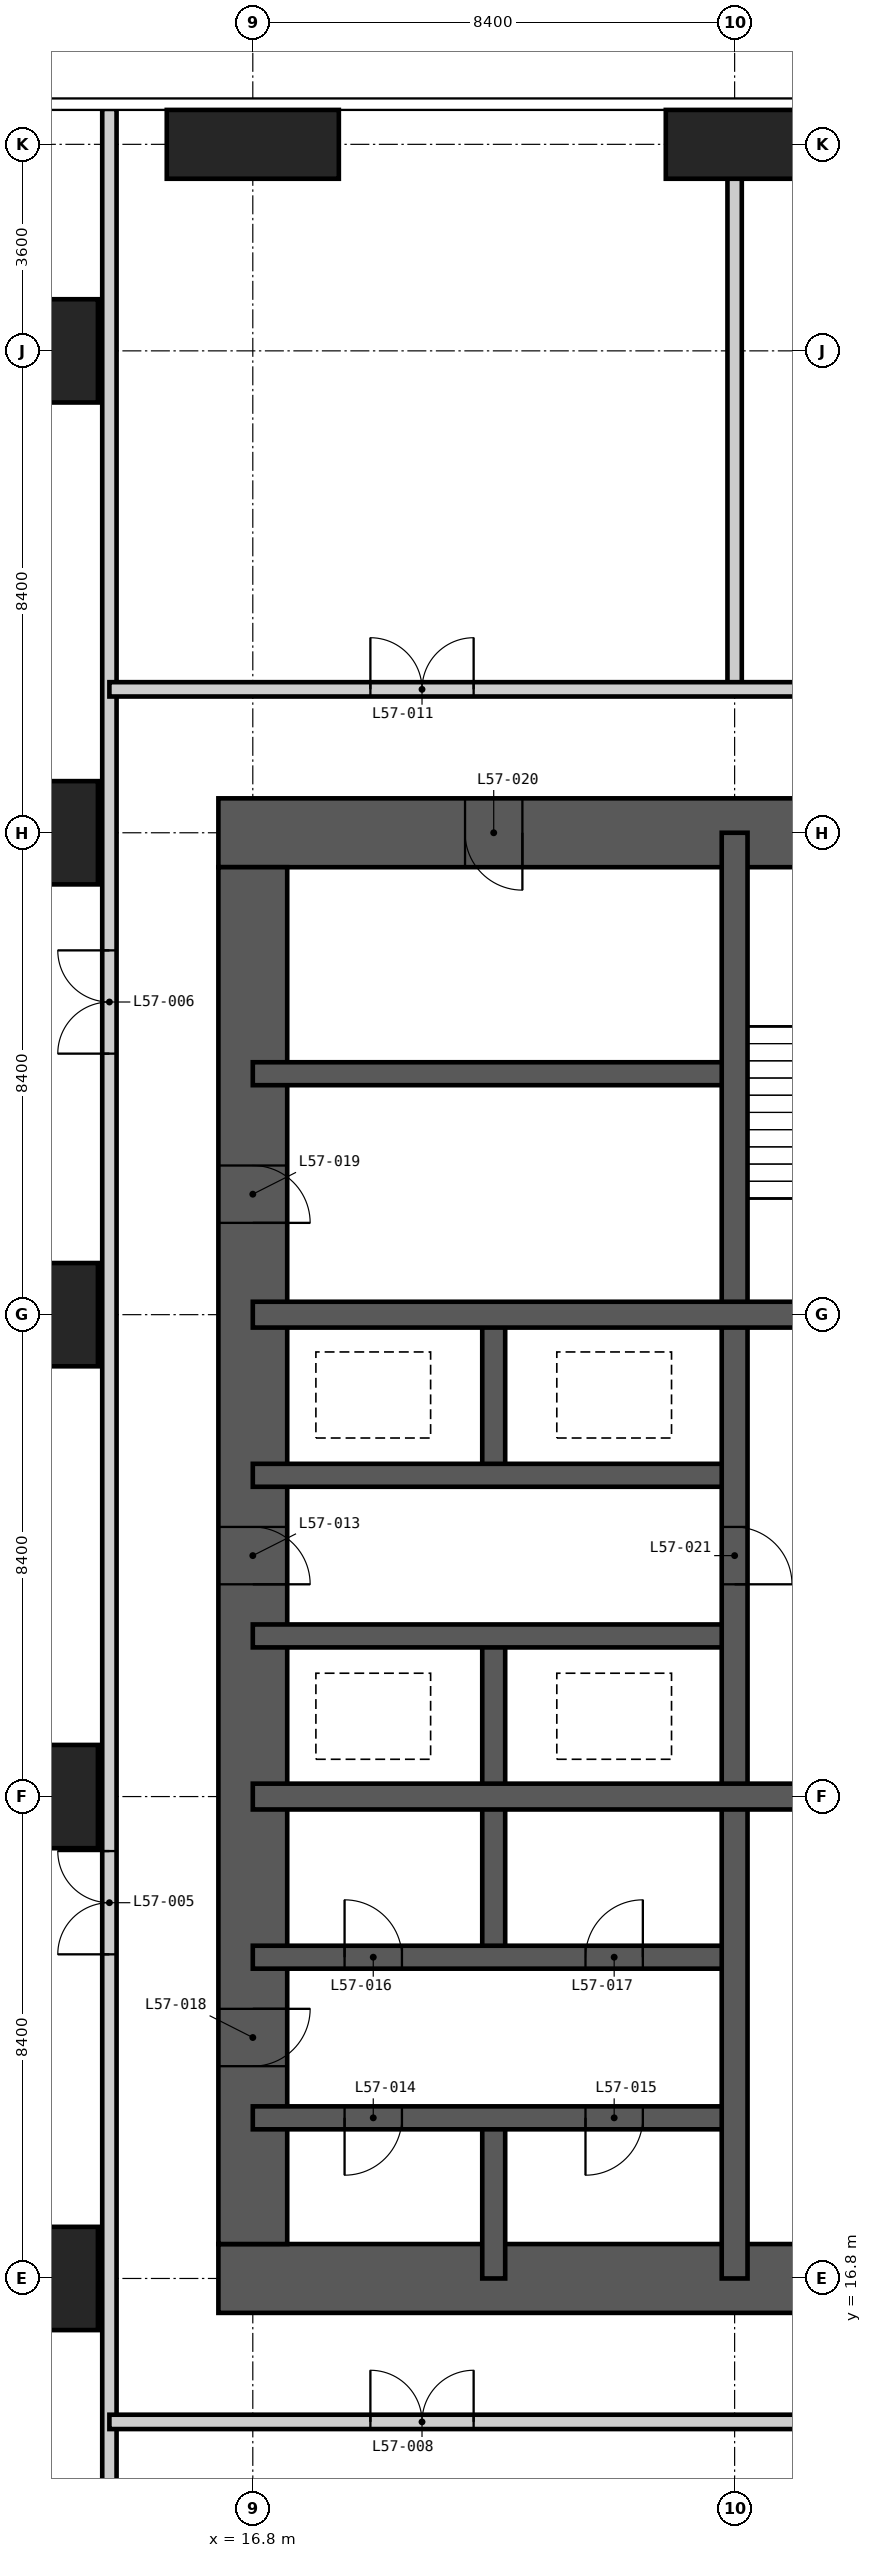
"""IFC4 building model, lengths in metres.
Left out: names, types, materials, properties, quantities, classifications, styles, units other than length and angle.
Written with IfcOpenShell. Run it as: python <this file> out.ifc"""

import sys

from ifc_helpers import new_model, si_unit, direction, frame, frame_2d, origin, origin_2d, place, context, subcontext, project, spatial, rectangle, extrude, element, fill, save


model = new_model("IFC4")
c1 = context("Model", 3, precision=1e-05, world=origin(), true_north=direction((0.0, 1.0)))
c2 = subcontext(c1, "Body", "Model", "MODEL_VIEW")
j1 = project(units=[si_unit("LENGTHUNIT", "METRE"), si_unit("PLANEANGLEUNIT", "RADIAN")], contexts=[c1])
p1 = place(None, origin())
s1 = spatial("IfcSite", under=j1, at=p1, CompositionType="ELEMENT")
p2 = place(p1, origin())
s2 = spatial("IfcBuilding", under=s1, at=p2, CompositionType="ELEMENT")
p3 = place(p2, frame((0.0, 0.0, 220.2)))
s3 = spatial("IfcBuildingStorey", under=s2, at=p3, CompositionType="ELEMENT", Elevation=220.2)
for number, where, z_axis, x_axis in (
    (1, (13.2, 16.8, -0.4), (0.0, 0.0, 1.0), (1.0, 0.0, 0.0)),
    (2, (13.2, 25.2, -0.4), (0.0, 0.0, 1.0), (1.0, 0.0, 0.0)),
    (3, (13.2, 33.6, -0.4), (0.0, 0.0, 1.0), (1.0, 0.0, 0.0)),
    (4, (13.2, 42.0, -0.4), (0.0, 0.0, 1.0), (1.0, 0.0, 0.0)),
    (5, (13.2, 50.4, -0.4), (0.0, 0.0, 1.0), (1.0, 0.0, 0.0)),
):
    element("IfcColumn", number, at=place(p3, frame(where, z_axis=z_axis, x_axis=x_axis)), inside=s3, PredefinedType="COLUMN", context=c2, shape_type="SweptSolid", body=[
        extrude(rectangle(XDim=1.8, YDim=1.8, at=origin_2d()), origin(), (0.0, 0.0, 1.0), 5.45),
    ])
p4 = place(p3, frame((16.8, 54.0, -0.4), z_axis=(0.0, 0.0, 1.0), x_axis=(1.0, 0.0, 0.0)))
e6 = element("IfcColumn", 6, at=p4, inside=s3, PredefinedType="COLUMN", context=c2, shape_type="SweptSolid", body=[
    extrude(rectangle(XDim=3.0, YDim=1.2, at=origin_2d()), origin(), (0.0, 0.0, 1.0), 5.45),
])
p5 = place(p3, frame((25.2, 54.0, -0.4), z_axis=(0.0, 0.0, 1.0), x_axis=(1.0, 0.0, 0.0)))
e7 = element("IfcColumn", 7, at=p5, inside=s3, PredefinedType="COLUMN", context=c2, shape_type="SweptSolid", body=[
    extrude(rectangle(XDim=2.4, YDim=1.2, at=origin_2d()), origin(), (0.0, 0.0, 1.0), 5.45),
])
p6 = place(p3, frame((16.2, 16.8, -0.4), z_axis=(0.0, 0.0, 1.0), x_axis=(1.0, 0.0, 0.0)))
e8 = element("IfcWall", 8, at=p6, inside=s3, PredefinedType="SHEAR", context=c2, shape_type="SweptSolid", body=[
    extrude(rectangle(XDim=26.4, YDim=1.2, at=frame_2d((13.2, 0.0))), origin(), (0.0, 0.0, 1.0), 5.45),
])
p7 = place(p6, frame((12.7, 0.0, 0.4)))
e9 = element("IfcOpeningElement", 9, at=p7, cuts=e8, PredefinedType="OPENING", context=c2, shape_type="SweptSolid", body=[
    extrude(rectangle(XDim=1.0, YDim=2.1, at=frame_2d((0.5, 1.05))), frame((0.0, 0.61, 0.0), z_axis=(0.0, -1.0, 0.0), x_axis=(1.0, 0.0, 0.0)), (0.0, 0.0, 1.0), 1.22),
])
p8 = place(p6, frame((19.0, 0.0, 0.4)))
e10 = element("IfcOpeningElement", 10, at=p8, cuts=e8, PredefinedType="OPENING", context=c2, shape_type="SweptSolid", body=[
    extrude(rectangle(XDim=1.0, YDim=2.1, at=frame_2d((0.5, 1.05))), frame((0.0, 0.61, 0.0), z_axis=(0.0, -1.0, 0.0), x_axis=(1.0, 0.0, 0.0)), (0.0, 0.0, 1.0), 1.22),
])
p9 = place(p3, frame((42.6, 42.0, -0.4), z_axis=(0.0, 0.0, 1.0), x_axis=(-1.0, 0.0, 0.0)))
e11 = element("IfcWall", 11, at=p9, inside=s3, PredefinedType="SHEAR", context=c2, shape_type="SweptSolid", body=[
    extrude(rectangle(XDim=26.4, YDim=1.2, at=frame_2d((13.2, 0.0))), origin(), (0.0, 0.0, 1.0), 5.45),
])
p10 = place(p9, frame((21.1, 0.0, 0.4)))
e12 = element("IfcOpeningElement", 12, at=p10, cuts=e11, PredefinedType="OPENING", context=c2, shape_type="SweptSolid", body=[
    extrude(rectangle(XDim=1.0, YDim=2.1, at=frame_2d((0.5, 1.05))), frame((0.0, 0.61, 0.0), z_axis=(0.0, -1.0, 0.0), x_axis=(1.0, 0.0, 0.0)), (0.0, 0.0, 1.0), 1.22),
])
p11 = place(p9, frame((10.5, 0.0, 0.4)))
e13 = element("IfcOpeningElement", 13, at=p11, cuts=e11, PredefinedType="OPENING", context=c2, shape_type="SweptSolid", body=[
    extrude(rectangle(XDim=1.2, YDim=2.2, at=frame_2d((0.6, 1.1))), frame((0.0, 0.61, 0.0), z_axis=(0.0, -1.0, 0.0), x_axis=(1.0, 0.0, 0.0)), (0.0, 0.0, 1.0), 1.22),
])
p12 = place(p3, frame((16.8, 41.4, -0.4), z_axis=(0.0, 0.0, 1.0), x_axis=(0.0, -1.0, 0.0)))
e14 = element("IfcWall", 14, at=p12, inside=s3, PredefinedType="SHEAR", context=c2, shape_type="SweptSolid", body=[
    extrude(rectangle(XDim=24.0, YDim=1.2, at=frame_2d((12.0, 0.0))), origin(), (0.0, 0.0, 1.0), 5.45),
])
p13 = place(p12, frame((11.5, 0.0, 0.4)))
e15 = element("IfcOpeningElement", 15, at=p13, cuts=e14, PredefinedType="OPENING", context=c2, shape_type="SweptSolid", body=[
    extrude(rectangle(XDim=1.0, YDim=2.1, at=frame_2d((0.5, 1.05))), frame((0.0, 0.61, 0.0), z_axis=(0.0, -1.0, 0.0), x_axis=(1.0, 0.0, 0.0)), (0.0, 0.0, 1.0), 1.22),
])
p14 = place(p12, frame((19.9, 0.0, 0.4)))
e16 = element("IfcOpeningElement", 16, at=p14, cuts=e14, PredefinedType="OPENING", context=c2, shape_type="SweptSolid", body=[
    extrude(rectangle(XDim=1.0, YDim=2.1, at=frame_2d((0.5, 1.05))), frame((0.0, 0.61, 0.0), z_axis=(0.0, -1.0, 0.0), x_axis=(1.0, 0.0, 0.0)), (0.0, 0.0, 1.0), 1.22),
])
p15 = place(p12, frame((5.2, 0.0, 0.4)))
e17 = element("IfcOpeningElement", 17, at=p15, cuts=e14, PredefinedType="OPENING", context=c2, shape_type="SweptSolid", body=[
    extrude(rectangle(XDim=1.0, YDim=2.1, at=frame_2d((0.5, 1.05))), frame((0.0, 0.61, 0.0), z_axis=(0.0, -1.0, 0.0), x_axis=(1.0, 0.0, 0.0)), (0.0, 0.0, 1.0), 1.22),
])
p16 = place(p3, frame((21.0, 16.8, -0.4), z_axis=(0.0, 0.0, 1.0), x_axis=(0.0, 1.0, 0.0)))
e18 = element("IfcWall", 18, at=p16, inside=s3, PredefinedType="SHEAR", context=c2, shape_type="SweptSolid", body=[
    extrude(rectangle(XDim=2.8, YDim=0.4, at=frame_2d((1.4, 0.0))), origin(), (0.0, 0.0, 1.0), 5.45),
])
p17 = place(p3, frame((21.0, 22.4, -0.4), z_axis=(0.0, 0.0, 1.0), x_axis=(0.0, 1.0, 0.0)))
e19 = element("IfcWall", 19, at=p17, inside=s3, PredefinedType="SHEAR", context=c2, shape_type="SweptSolid", body=[
    extrude(rectangle(XDim=5.6, YDim=0.4, at=frame_2d((2.8, 0.0))), origin(), (0.0, 0.0, 1.0), 5.45),
])
p18 = place(p3, frame((21.0, 30.8, -0.4), z_axis=(0.0, 0.0, 1.0), x_axis=(0.0, 1.0, 0.0)))
e20 = element("IfcWall", 20, at=p18, inside=s3, PredefinedType="SHEAR", context=c2, shape_type="SweptSolid", body=[
    extrude(rectangle(XDim=2.8, YDim=0.4, at=frame_2d((1.4, 0.0))), origin(), (0.0, 0.0, 1.0), 5.45),
])
p19 = place(p3, frame((16.8, 19.6, -0.4), z_axis=(0.0, 0.0, 1.0), x_axis=(1.0, 0.0, 0.0)))
e21 = element("IfcWall", 21, at=p19, inside=s3, PredefinedType="SHEAR", context=c2, shape_type="SweptSolid", body=[
    extrude(rectangle(XDim=8.4, YDim=0.4, at=frame_2d((4.2, 0.0))), origin(), (0.0, 0.0, 1.0), 5.45),
])
p20 = place(p19, frame((1.6, 0.0, 0.4)))
e22 = element("IfcOpeningElement", 22, at=p20, cuts=e21, PredefinedType="OPENING", context=c2, shape_type="SweptSolid", body=[
    extrude(rectangle(XDim=1.0, YDim=2.1, at=frame_2d((0.5, 1.05))), frame((0.0, 0.21, 0.0), z_axis=(0.0, -1.0, 0.0), x_axis=(1.0, 0.0, 0.0)), (0.0, 0.0, 1.0), 0.42),
])
p21 = place(p19, frame((5.8, 0.0, 0.4)))
e23 = element("IfcOpeningElement", 23, at=p21, cuts=e21, PredefinedType="OPENING", context=c2, shape_type="SweptSolid", body=[
    extrude(rectangle(XDim=1.0, YDim=2.1, at=frame_2d((0.5, 1.05))), frame((0.0, 0.21, 0.0), z_axis=(0.0, -1.0, 0.0), x_axis=(1.0, 0.0, 0.0)), (0.0, 0.0, 1.0), 0.42),
])
p22 = place(p3, frame((16.8, 22.4, -0.4), z_axis=(0.0, 0.0, 1.0), x_axis=(1.0, 0.0, 0.0)))
e24 = element("IfcWall", 24, at=p22, inside=s3, PredefinedType="SHEAR", context=c2, shape_type="SweptSolid", body=[
    extrude(rectangle(XDim=8.4, YDim=0.4, at=frame_2d((4.2, 0.0))), origin(), (0.0, 0.0, 1.0), 5.45),
])
p23 = place(p22, frame((1.6, 0.0, 0.4)))
e25 = element("IfcOpeningElement", 25, at=p23, cuts=e24, PredefinedType="OPENING", context=c2, shape_type="SweptSolid", body=[
    extrude(rectangle(XDim=1.0, YDim=2.1, at=frame_2d((0.5, 1.05))), frame((0.0, 0.21, 0.0), z_axis=(0.0, -1.0, 0.0), x_axis=(1.0, 0.0, 0.0)), (0.0, 0.0, 1.0), 0.42),
])
p24 = place(p22, frame((5.8, 0.0, 0.4)))
e26 = element("IfcOpeningElement", 26, at=p24, cuts=e24, PredefinedType="OPENING", context=c2, shape_type="SweptSolid", body=[
    extrude(rectangle(XDim=1.0, YDim=2.1, at=frame_2d((0.5, 1.05))), frame((0.0, 0.21, 0.0), z_axis=(0.0, -1.0, 0.0), x_axis=(1.0, 0.0, 0.0)), (0.0, 0.0, 1.0), 0.42),
])
for number, where, z_axis, x_axis in (
    (27, (16.8, 28.0, -0.4), (0.0, 0.0, 1.0), (1.0, 0.0, 0.0)),
    (28, (16.8, 30.8, -0.4), (0.0, 0.0, 1.0), (1.0, 0.0, 0.0)),
    (29, (16.8, 37.8, -0.4), (0.0, 0.0, 1.0), (1.0, 0.0, 0.0)),
):
    element("IfcWall", number, at=place(p3, frame(where, z_axis=z_axis, x_axis=x_axis)), inside=s3, PredefinedType="SHEAR", context=c2, shape_type="SweptSolid", body=[
        extrude(rectangle(XDim=8.4, YDim=0.4, at=frame_2d((4.2, 0.0))), origin(), (0.0, 0.0, 1.0), 5.45),
    ])
p25 = place(p3, frame((25.2, 16.8, -0.4), z_axis=(0.0, 0.0, 1.0), x_axis=(0.0, 1.0, 0.0)))
e30 = element("IfcWall", 30, at=p25, inside=s3, PredefinedType="SHEAR", context=c2, shape_type="SweptSolid", body=[
    extrude(rectangle(XDim=25.2, YDim=0.45, at=frame_2d((12.6, 0.0))), origin(), (0.0, 0.0, 1.0), 5.45),
])
p26 = place(p25, frame((12.1, 0.0, 0.4)))
e31 = element("IfcOpeningElement", 31, at=p26, cuts=e30, PredefinedType="OPENING", context=c2, shape_type="SweptSolid", body=[
    extrude(rectangle(XDim=1.0, YDim=2.1, at=frame_2d((0.5, 1.05))), frame((0.0, 0.235, 0.0), z_axis=(0.0, -1.0, 0.0), x_axis=(1.0, 0.0, 0.0)), (0.0, 0.0, 1.0), 0.47),
])
for number, where, z_axis, x_axis in (
    (32, (16.8, 25.2, -0.4), (0.0, 0.0, 1.0), (1.0, 0.0, 0.0)),
    (33, (16.8, 33.6, -0.4), (0.0, 0.0, 1.0), (1.0, 0.0, 0.0)),
):
    element("IfcWall", number, at=place(p3, frame(where, z_axis=z_axis, x_axis=x_axis)), inside=s3, PredefinedType="SHEAR", context=c2, shape_type="SweptSolid", body=[
        extrude(rectangle(XDim=25.2, YDim=0.45, at=frame_2d((12.6, 0.0))), origin(), (0.0, 0.0, 1.0), 5.45),
    ])
p27 = place(p3, frame((14.3, 4.182, 0.0), z_axis=(0.0, 0.0, 1.0), x_axis=(0.0, 1.0, 0.0)))
e34 = element("IfcWall", 34, at=p27, inside=s3, PredefinedType="PARTITIONING", context=c2, shape_type="SweptSolid", body=[
    extrude(rectangle(XDim=50.436, YDim=0.25, at=frame_2d((25.218, 0.0))), origin(), (0.0, 0.0, 1.0), 5.05),
])
p28 = place(p27, frame((18.268, 0.0, 0.0)))
e35 = element("IfcOpeningElement", 35, at=p28, cuts=e34, PredefinedType="OPENING", context=c2, shape_type="SweptSolid", body=[
    extrude(rectangle(XDim=1.8, YDim=2.4, at=frame_2d((0.9, 1.2))), frame((0.0, 0.135, 0.0), z_axis=(0.0, -1.0, 0.0), x_axis=(1.0, 0.0, 0.0)), (0.0, 0.0, 1.0), 0.27),
])
p29 = place(p27, frame((33.968, 0.0, 0.0)))
e36 = element("IfcOpeningElement", 36, at=p29, cuts=e34, PredefinedType="OPENING", context=c2, shape_type="SweptSolid", body=[
    extrude(rectangle(XDim=1.8, YDim=2.4, at=frame_2d((0.9, 1.2))), frame((0.0, 0.135, 0.0), z_axis=(0.0, -1.0, 0.0), x_axis=(1.0, 0.0, 0.0)), (0.0, 0.0, 1.0), 0.27),
])
p30 = place(p3, frame((25.2, 44.5, 0.0), z_axis=(0.0, 0.0, 1.0), x_axis=(0.0, 1.0, 0.0)))
e37 = element("IfcWall", 37, at=p30, inside=s3, PredefinedType="PARTITIONING", context=c2, shape_type="SweptSolid", body=[
    extrude(rectangle(XDim=10.118, YDim=0.25, at=frame_2d((5.059, 0.0))), origin(), (0.0, 0.0, 1.0), 5.05),
])
p31 = place(p3, frame((14.3, 14.3, 0.0), z_axis=(0.0, 0.0, 1.0), x_axis=(1.0, 0.0, 0.0)))
e38 = element("IfcWall", 38, at=p31, inside=s3, PredefinedType="PARTITIONING", context=c2, shape_type="SweptSolid", body=[
    extrude(rectangle(XDim=30.2, YDim=0.25, at=frame_2d((15.1, 0.0))), origin(), (0.0, 0.0, 1.0), 5.05),
])
p32 = place(p31, frame((19.65, 0.0, 0.0)))
e39 = element("IfcOpeningElement", 39, at=p32, cuts=e38, PredefinedType="OPENING", context=c2, shape_type="SweptSolid", body=[
    extrude(rectangle(XDim=1.8, YDim=2.4, at=frame_2d((0.9, 1.2))), frame((0.0, 0.135, 0.0), z_axis=(0.0, -1.0, 0.0), x_axis=(1.0, 0.0, 0.0)), (0.0, 0.0, 1.0), 0.27),
])
p33 = place(p31, frame((4.55, 0.0, 0.0)))
e40 = element("IfcOpeningElement", 40, at=p33, cuts=e38, PredefinedType="OPENING", context=c2, shape_type="SweptSolid", body=[
    extrude(rectangle(XDim=1.8, YDim=2.4, at=frame_2d((0.9, 1.2))), frame((0.0, 0.135, 0.0), z_axis=(0.0, -1.0, 0.0), x_axis=(1.0, 0.0, 0.0)), (0.0, 0.0, 1.0), 0.27),
])
p34 = place(p3, frame((14.3, 44.5, 0.0), z_axis=(0.0, 0.0, 1.0), x_axis=(1.0, 0.0, 0.0)))
e41 = element("IfcWall", 41, at=p34, inside=s3, PredefinedType="PARTITIONING", context=c2, shape_type="SweptSolid", body=[
    extrude(rectangle(XDim=30.2, YDim=0.25, at=frame_2d((15.1, 0.0))), origin(), (0.0, 0.0, 1.0), 5.05),
])
p35 = place(p34, frame((4.55, 0.0, 0.0)))
e42 = element("IfcOpeningElement", 42, at=p35, cuts=e41, PredefinedType="OPENING", context=c2, shape_type="SweptSolid", body=[
    extrude(rectangle(XDim=1.8, YDim=2.4, at=frame_2d((0.9, 1.2))), frame((0.0, 0.135, 0.0), z_axis=(0.0, -1.0, 0.0), x_axis=(1.0, 0.0, 0.0)), (0.0, 0.0, 1.0), 0.27),
])
p36 = place(p34, frame((19.65, 0.0, 0.0)))
e43 = element("IfcOpeningElement", 43, at=p36, cuts=e41, PredefinedType="OPENING", context=c2, shape_type="SweptSolid", body=[
    extrude(rectangle(XDim=1.8, YDim=2.4, at=frame_2d((0.9, 1.2))), frame((0.0, 0.135, 0.0), z_axis=(0.0, -1.0, 0.0), x_axis=(1.0, 0.0, 0.0)), (0.0, 0.0, 1.0), 0.27),
])
p37 = place(p28, origin())
e44 = element("IfcDoor", 44, at=p37, inside=s3, OperationType="DOUBLE_DOOR_DOUBLE_SWING", PredefinedType="DOOR", context=c2, shape_type="SweptSolid", body=[
    extrude(rectangle(XDim=1.8, YDim=2.4, at=frame_2d((0.9, 1.2))), frame((0.0, 0.025, 0.0), z_axis=(0.0, -1.0, 0.0), x_axis=(1.0, 0.0, 0.0)), (0.0, 0.0, 1.0), 0.05),
])
fill(e35, e44)
p38 = place(p29, origin())
e45 = element("IfcDoor", 45, at=p38, inside=s3, OperationType="DOUBLE_DOOR_DOUBLE_SWING", PredefinedType="DOOR", context=c2, shape_type="SweptSolid", body=[
    extrude(rectangle(XDim=1.8, YDim=2.4, at=frame_2d((0.9, 1.2))), frame((0.0, 0.025, 0.0), z_axis=(0.0, -1.0, 0.0), x_axis=(1.0, 0.0, 0.0)), (0.0, 0.0, 1.0), 0.05),
])
fill(e36, e45)
p39 = place(p33, origin())
e46 = element("IfcDoor", 46, at=p39, inside=s3, OperationType="DOUBLE_DOOR_DOUBLE_SWING", PredefinedType="DOOR", context=c2, shape_type="SweptSolid", body=[
    extrude(rectangle(XDim=1.8, YDim=2.4, at=frame_2d((0.9, 1.2))), frame((0.0, 0.025, 0.0), z_axis=(0.0, -1.0, 0.0), x_axis=(1.0, 0.0, 0.0)), (0.0, 0.0, 1.0), 0.05),
])
fill(e40, e46)
p40 = place(p35, origin())
e47 = element("IfcDoor", 47, at=p40, inside=s3, OperationType="DOUBLE_DOOR_DOUBLE_SWING", PredefinedType="DOOR", context=c2, shape_type="SweptSolid", body=[
    extrude(rectangle(XDim=1.8, YDim=2.4, at=frame_2d((0.9, 1.2))), frame((0.0, 0.025, 0.0), z_axis=(0.0, -1.0, 0.0), x_axis=(1.0, 0.0, 0.0)), (0.0, 0.0, 1.0), 0.05),
])
fill(e42, e47)
p41 = place(p13, origin())
e48 = element("IfcDoor", 48, at=p41, inside=s3, OperationType="SINGLE_SWING_RIGHT", PredefinedType="DOOR", context=c2, shape_type="SweptSolid", body=[
    extrude(rectangle(XDim=1.0, YDim=2.1, at=frame_2d((0.5, 1.05))), frame((0.0, 0.025, 0.0), z_axis=(0.0, -1.0, 0.0), x_axis=(1.0, 0.0, 0.0)), (0.0, 0.0, 1.0), 0.05),
])
fill(e15, e48)
p42 = place(p20, frame((1.0, 0.0, 0.0), z_axis=(0.0, 0.0, 1.0), x_axis=(-1.0, 0.0, 0.0)))
e49 = element("IfcDoor", 49, at=p42, inside=s3, OperationType="SINGLE_SWING_RIGHT", PredefinedType="DOOR", context=c2, shape_type="SweptSolid", body=[
    extrude(rectangle(XDim=1.0, YDim=2.1, at=frame_2d((0.5, 1.05))), frame((0.0, 0.025, 0.0), z_axis=(0.0, -1.0, 0.0), x_axis=(1.0, 0.0, 0.0)), (0.0, 0.0, 1.0), 0.05),
])
fill(e22, e49)
p43 = place(p21, frame((1.0, 0.0, 0.0), z_axis=(0.0, 0.0, 1.0), x_axis=(-1.0, 0.0, 0.0)))
e50 = element("IfcDoor", 50, at=p43, inside=s3, OperationType="SINGLE_SWING_RIGHT", PredefinedType="DOOR", context=c2, shape_type="SweptSolid", body=[
    extrude(rectangle(XDim=1.0, YDim=2.1, at=frame_2d((0.5, 1.05))), frame((0.0, 0.025, 0.0), z_axis=(0.0, -1.0, 0.0), x_axis=(1.0, 0.0, 0.0)), (0.0, 0.0, 1.0), 0.05),
])
fill(e23, e50)
p44 = place(p23, origin())
e51 = element("IfcDoor", 51, at=p44, inside=s3, OperationType="SINGLE_SWING_LEFT", PredefinedType="DOOR", context=c2, shape_type="SweptSolid", body=[
    extrude(rectangle(XDim=1.0, YDim=2.1, at=frame_2d((0.5, 1.05))), frame((0.0, 0.025, 0.0), z_axis=(0.0, -1.0, 0.0), x_axis=(1.0, 0.0, 0.0)), (0.0, 0.0, 1.0), 0.05),
])
fill(e25, e51)
p45 = place(p24, origin())
e52 = element("IfcDoor", 52, at=p45, inside=s3, OperationType="SINGLE_SWING_RIGHT", PredefinedType="DOOR", context=c2, shape_type="SweptSolid", body=[
    extrude(rectangle(XDim=1.0, YDim=2.1, at=frame_2d((0.5, 1.05))), frame((0.0, 0.025, 0.0), z_axis=(0.0, -1.0, 0.0), x_axis=(1.0, 0.0, 0.0)), (0.0, 0.0, 1.0), 0.05),
])
fill(e26, e52)
p46 = place(p14, origin())
e53 = element("IfcDoor", 53, at=p46, inside=s3, OperationType="SINGLE_SWING_LEFT", PredefinedType="DOOR", context=c2, shape_type="SweptSolid", body=[
    extrude(rectangle(XDim=1.0, YDim=2.1, at=frame_2d((0.5, 1.05))), frame((0.0, 0.025, 0.0), z_axis=(0.0, -1.0, 0.0), x_axis=(1.0, 0.0, 0.0)), (0.0, 0.0, 1.0), 0.05),
])
fill(e16, e53)
p47 = place(p15, origin())
e54 = element("IfcDoor", 54, at=p47, inside=s3, OperationType="SINGLE_SWING_RIGHT", PredefinedType="DOOR", context=c2, shape_type="SweptSolid", body=[
    extrude(rectangle(XDim=1.0, YDim=2.1, at=frame_2d((0.5, 1.05))), frame((0.0, 0.025, 0.0), z_axis=(0.0, -1.0, 0.0), x_axis=(1.0, 0.0, 0.0)), (0.0, 0.0, 1.0), 0.05),
])
fill(e17, e54)
p48 = place(p10, origin())
e55 = element("IfcDoor", 55, at=p48, inside=s3, OperationType="SINGLE_SWING_LEFT", PredefinedType="DOOR", context=c2, shape_type="SweptSolid", body=[
    extrude(rectangle(XDim=1.0, YDim=2.1, at=frame_2d((0.5, 1.05))), frame((0.0, 0.025, 0.0), z_axis=(0.0, -1.0, 0.0), x_axis=(1.0, 0.0, 0.0)), (0.0, 0.0, 1.0), 0.05),
])
fill(e12, e55)
p49 = place(p26, frame((1.0, 0.0, 0.0), z_axis=(0.0, 0.0, 1.0), x_axis=(-1.0, 0.0, 0.0)))
e56 = element("IfcDoor", 56, at=p49, inside=s3, OperationType="SINGLE_SWING_RIGHT", PredefinedType="DOOR", context=c2, shape_type="SweptSolid", body=[
    extrude(rectangle(XDim=1.0, YDim=2.1, at=frame_2d((0.5, 1.05))), frame((0.0, 0.025, 0.0), z_axis=(0.0, -1.0, 0.0), x_axis=(1.0, 0.0, 0.0)), (0.0, 0.0, 1.0), 0.05),
])
fill(e31, e56)
save(model, sys.argv[1])
